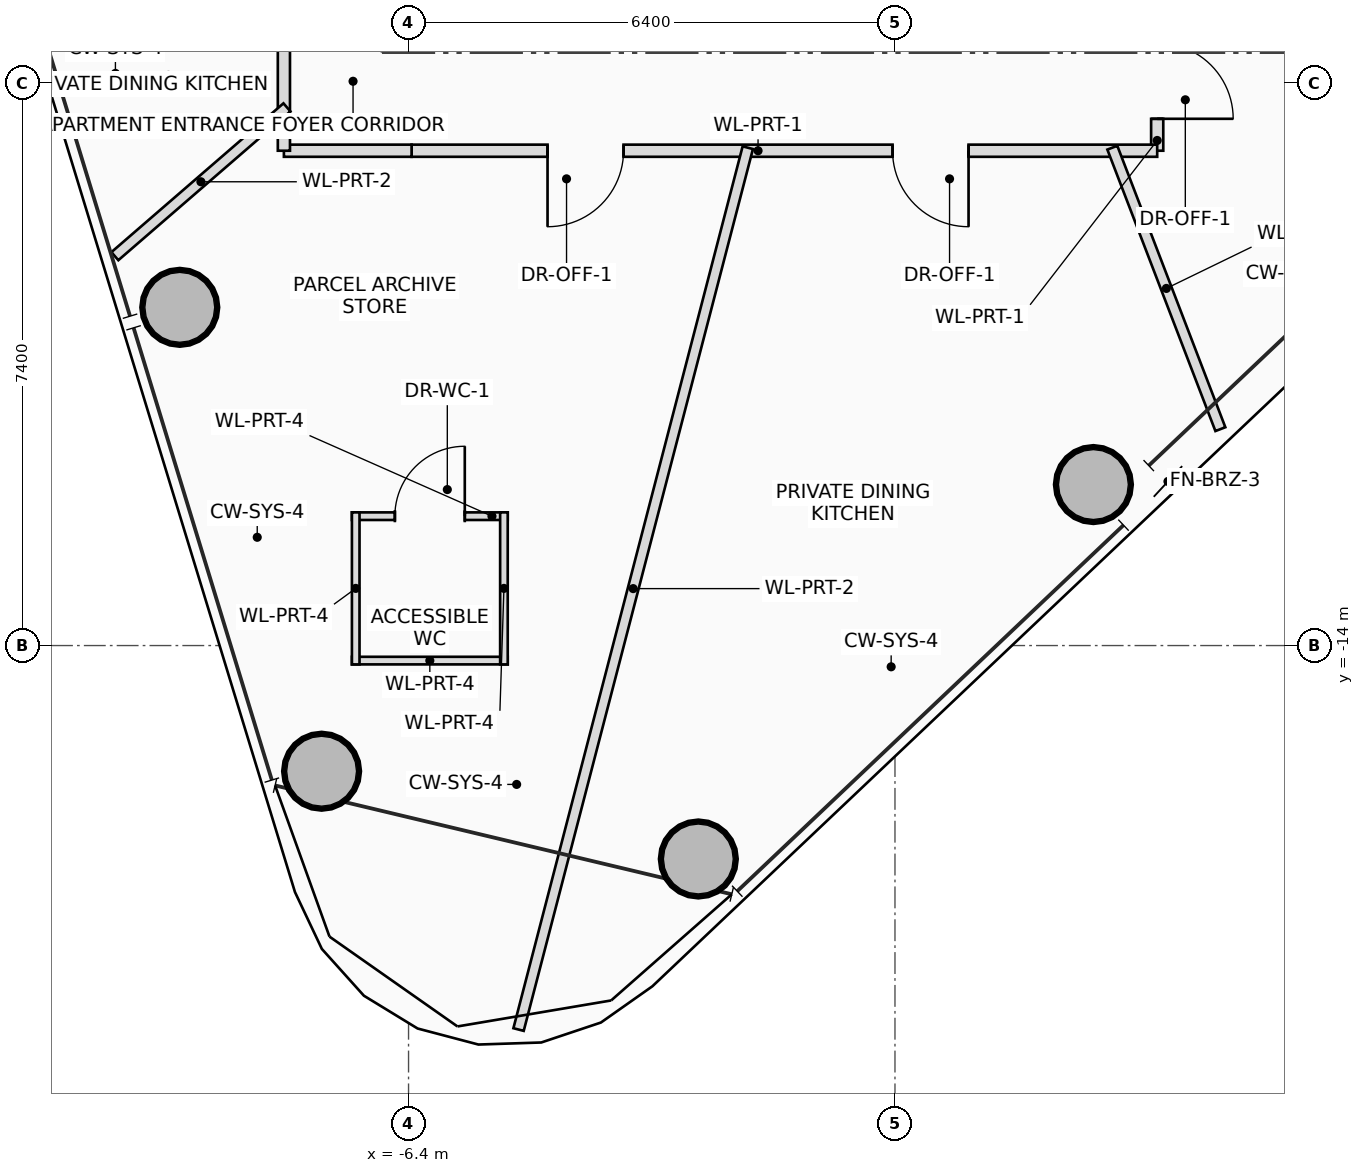
"""IFC4 building model, lengths in metres.
Left out: names, types, materials, properties, quantities, classifications, styles, units other than length and angle.
Written with IfcOpenShell. Run it as: python <this file> out.ifc"""

import sys

from ifc_helpers import new_model, si_unit, direction, frame, frame_2d, origin, origin_2d, place, context, subcontext, project, spatial, rectangle, hollow_circle, extrude, source, transform, mapped, element, fill, save


model = new_model("IFC4")
c1 = context("Model", 3, precision=1e-05, world=origin(), true_north=direction((0.0, 1.0)))
c2 = subcontext(c1, "Body", "Model", "MODEL_VIEW")
j1 = project(units=[si_unit("LENGTHUNIT", "METRE"), si_unit("PLANEANGLEUNIT", "RADIAN")], contexts=[c1])
p1 = place(None, origin())
s1 = spatial("IfcSite", under=j1, at=p1, CompositionType="ELEMENT")
p2 = place(p1, origin())
s2 = spatial("IfcBuilding", under=s1, at=p2, CompositionType="ELEMENT")
p3 = place(p2, frame((0.0, 0.0, 238.85)))
s3 = spatial("IfcBuildingStorey", under=s2, at=p3, CompositionType="ELEMENT", Elevation=238.85)
m1 = source(origin(), c2, "Body", "SweptSolid", [
    extrude(hollow_circle(Radius=0.5, WallThickness=0.04, at=origin_2d()), origin(), (0.0, 0.0, 1.0), 3.4),
])
for number, where, z_axis, x_axis in (
    (1, (-2.587, -16.808, 0.0), (0.0, 0.0, 1.0), (1.0, 0.0, 0.0)),
    (2, (2.611, -11.882, 0.0), (0.0, 0.0, 1.0), (1.0, 0.0, 0.0)),
    (3, (-9.41, -9.55, 0.0), (0.0, 0.0, 1.0), (1.0, 0.0, 0.0)),
    (4, (-7.544, -15.653, 0.0), (0.0, 0.0, 1.0), (1.0, 0.0, 0.0)),
):
    element("IfcColumn", number, at=place(p3, frame(where, z_axis=z_axis, x_axis=x_axis)), inside=s3, PredefinedType="COLUMN", context=c2, shape_type="MappedRepresentation", body=[
        mapped(m1, transform((0.0, 0.0, 0.0), scale=1.0)),
    ])
p4 = place(p3, frame((-7.145, -12.298, 0.0), z_axis=(0.0, 0.0, 1.0), x_axis=(1.0, 0.0, 0.0)))
e5 = element("IfcWall", 5, at=p4, inside=s3, PredefinedType="PARTITIONING", context=c2, shape_type="SweptSolid", body=[
    extrude(rectangle(XDim=2.05, YDim=0.1, at=frame_2d((1.025, 0.0))), origin(), (0.0, 0.0, 1.0), 2.605),
])
p5 = place(p4, frame((0.565, 0.0, 0.0)))
e6 = element("IfcOpeningElement", 6, at=p5, cuts=e5, PredefinedType="OPENING", context=c2, shape_type="SweptSolid", body=[
    extrude(rectangle(XDim=0.92, YDim=2.1, at=frame_2d((0.46, 1.05))), frame((0.0, 0.06, 0.0), z_axis=(0.0, -1.0, 0.0), x_axis=(1.0, 0.0, 0.0)), (0.0, 0.0, 1.0), 0.12),
])
p6 = place(p3, frame((-5.095, -14.198, 0.0), z_axis=(0.0, 0.0, 1.0), x_axis=(-1.0, 0.0, 0.0)))
e7 = element("IfcWall", 7, at=p6, inside=s3, PredefinedType="PARTITIONING", context=c2, shape_type="SweptSolid", body=[
    extrude(rectangle(XDim=2.05, YDim=0.1, at=frame_2d((1.025, 0.0))), origin(), (0.0, 0.0, 1.0), 3.2),
])
p7 = place(p3, frame((-5.145, -12.248, 0.0), z_axis=(0.0, 0.0, 1.0), x_axis=(0.0, -1.0, 0.0)))
e8 = element("IfcWall", 8, at=p7, inside=s3, PredefinedType="PARTITIONING", context=c2, shape_type="SweptSolid", body=[
    extrude(rectangle(XDim=2.0, YDim=0.1, at=frame_2d((1.0, 0.0))), origin(), (0.0, 0.0, 1.0), 2.855),
])
p8 = place(p3, frame((-7.095, -14.248, 0.0), z_axis=(0.0, 0.0, 1.0), x_axis=(0.0, 1.0, 0.0)))
e9 = element("IfcWall", 9, at=p8, inside=s3, PredefinedType="PARTITIONING", context=c2, shape_type="SweptSolid", body=[
    extrude(rectangle(XDim=2.0, YDim=0.1, at=frame_2d((1.0, 0.0))), origin(), (0.0, 0.0, 1.0), 2.605),
])
p9 = place(p3, frame((3.45, -5.85, 0.0), z_axis=(0.0, 0.0, 1.0), x_axis=(0.0, -1.0, 0.0)))
e10 = element("IfcWall", 10, at=p9, inside=s3, PredefinedType="PARTITIONING", context=c2, shape_type="SweptSolid", body=[
    extrude(rectangle(XDim=1.64, YDim=0.16, at=frame_2d((0.82, 0.0))), origin(), (0.0, 0.0, 1.0), 3.2),
])
p10 = place(p9, frame((0.22, 0.0, 0.0)))
e11 = element("IfcOpeningElement", 11, at=p10, cuts=e10, PredefinedType="OPENING", context=c2, shape_type="SweptSolid", body=[
    extrude(rectangle(XDim=1.0, YDim=2.25, at=frame_2d((0.5, 1.125))), frame((0.0, 0.09, 0.0), z_axis=(0.0, -1.0, 0.0), x_axis=(1.0, 0.0, 0.0)), (0.0, 0.0, 1.0), 0.18),
])
p11 = place(p3, frame((3.45, -7.49, 0.0), z_axis=(0.0, 0.0, 1.0), x_axis=(-1.0, 0.0, 0.0)))
e12 = element("IfcWall", 12, at=p11, inside=s3, PredefinedType="PARTITIONING", context=c2, shape_type="SweptSolid", body=[
    extrude(rectangle(XDim=9.81, YDim=0.16, at=frame_2d((4.905, 0.0))), origin(), (0.0, 0.0, 1.0), 2.605),
])
p12 = place(p11, frame((2.482, 0.0, 0.0)))
e13 = element("IfcOpeningElement", 13, at=p12, cuts=e12, PredefinedType="OPENING", context=c2, shape_type="SweptSolid", body=[
    extrude(rectangle(XDim=1.0, YDim=2.25, at=frame_2d((0.5, 1.125))), frame((0.0, 0.09, 0.0), z_axis=(0.0, -1.0, 0.0), x_axis=(1.0, 0.0, 0.0)), (0.0, 0.0, 1.0), 0.18),
])
p13 = place(p11, frame((7.021, 0.0, 0.0)))
e14 = element("IfcOpeningElement", 14, at=p13, cuts=e12, PredefinedType="OPENING", context=c2, shape_type="SweptSolid", body=[
    extrude(rectangle(XDim=1.0, YDim=2.25, at=frame_2d((0.5, 1.125))), frame((0.0, 0.09, 0.0), z_axis=(0.0, -1.0, 0.0), x_axis=(1.0, 0.0, 0.0)), (0.0, 0.0, 1.0), 0.18),
])
p14 = place(p3, frame((-6.36, -7.49, 0.0), z_axis=(0.0, 0.0, 1.0), x_axis=(-1.0, 0.0, 0.0)))
e15 = element("IfcWall", 15, at=p14, inside=s3, PredefinedType="PARTITIONING", context=c2, shape_type="SweptSolid", body=[
    extrude(rectangle(XDim=1.68, YDim=0.16, at=frame_2d((0.84, 0.0))), origin(), (0.0, 0.0, 1.0), 2.605),
])
p15 = place(p3, frame((-8.04, -7.49, 0.0), z_axis=(0.0, 0.0, 1.0), x_axis=(0.0, 1.0, 0.0)))
e16 = element("IfcWall", 16, at=p15, inside=s3, PredefinedType="PARTITIONING", context=c2, shape_type="SweptSolid", body=[
    extrude(rectangle(XDim=1.64, YDim=0.16, at=frame_2d((0.82, 0.0))), origin(), (0.0, 0.0, 1.0), 2.805),
])
p16 = place(p3, frame((-8.0, -6.919, 0.0), z_axis=(0.0, 0.0, 1.0), x_axis=(-0.756358809539, -0.654156977516, 0.0)))
e17 = element("IfcWall", 17, at=p16, inside=s3, PredefinedType="PARTITIONING", context=c2, shape_type="SweptSolid", body=[
    extrude(rectangle(XDim=2.993, YDim=0.14, at=frame_2d((1.497, 0.0))), origin(), (0.0, 0.0, 1.0), 2.765),
])
p17 = place(p3, frame((-1.937, -7.45, 0.0), z_axis=(0.0, 0.0, 1.0), x_axis=(-0.251581963347, -0.967835996292, 0.0)))
e18 = element("IfcWall", 18, at=p17, inside=s3, PredefinedType="PARTITIONING", context=c2, shape_type="SweptSolid", body=[
    extrude(rectangle(XDim=11.988, YDim=0.14, at=frame_2d((5.994, 0.0))), origin(), (0.0, 0.0, 1.0), 2.605),
])
p18 = place(p3, frame((2.86, -7.45, 0.0), z_axis=(0.0, 0.0, 1.0), x_axis=(0.35834382605, -0.933589686282, 0.0)))
e19 = element("IfcWall", 19, at=p18, inside=s3, PredefinedType="PARTITIONING", context=c2, shape_type="SweptSolid", body=[
    extrude(rectangle(XDim=3.967, YDim=0.14, at=frame_2d((1.983, 0.0))), origin(), (0.0, 0.0, 1.0), 2.605),
])
p19 = place(p5, origin())
e20 = element("IfcDoor", 20, at=p19, inside=s3, OperationType="SINGLE_SWING_RIGHT", PredefinedType="DOOR", context=c2, shape_type="SweptSolid", body=[
    extrude(rectangle(XDim=0.92, YDim=2.1, at=frame_2d((0.46, 1.05))), frame((0.0, 0.025, 0.0), z_axis=(0.0, -1.0, 0.0), x_axis=(1.0, 0.0, 0.0)), (0.0, 0.0, 1.0), 0.05),
])
fill(e6, e20)
p20 = place(p10, origin())
e21 = element("IfcDoor", 21, at=p20, inside=s3, OperationType="SINGLE_SWING_RIGHT", PredefinedType="DOOR", context=c2, shape_type="SweptSolid", body=[
    extrude(rectangle(XDim=1.0, YDim=2.25, at=frame_2d((0.5, 1.125))), frame((0.0, 0.025, 0.0), z_axis=(0.0, -1.0, 0.0), x_axis=(1.0, 0.0, 0.0)), (0.0, 0.0, 1.0), 0.05),
])
fill(e11, e21)
p21 = place(p12, origin())
e22 = element("IfcDoor", 22, at=p21, inside=s3, OperationType="SINGLE_SWING_LEFT", PredefinedType="DOOR", context=c2, shape_type="SweptSolid", body=[
    extrude(rectangle(XDim=1.0, YDim=2.25, at=frame_2d((0.5, 1.125))), frame((0.0, 0.025, 0.0), z_axis=(0.0, -1.0, 0.0), x_axis=(1.0, 0.0, 0.0)), (0.0, 0.0, 1.0), 0.05),
])
fill(e13, e22)
p22 = place(p13, origin())
e23 = element("IfcDoor", 23, at=p22, inside=s3, OperationType="SINGLE_SWING_RIGHT", PredefinedType="DOOR", context=c2, shape_type="SweptSolid", body=[
    extrude(rectangle(XDim=1.0, YDim=2.25, at=frame_2d((0.5, 1.125))), frame((0.0, 0.025, 0.0), z_axis=(0.0, -1.0, 0.0), x_axis=(1.0, 0.0, 0.0)), (0.0, 0.0, 1.0), 0.05),
])
fill(e14, e23)
save(model, sys.argv[1])
